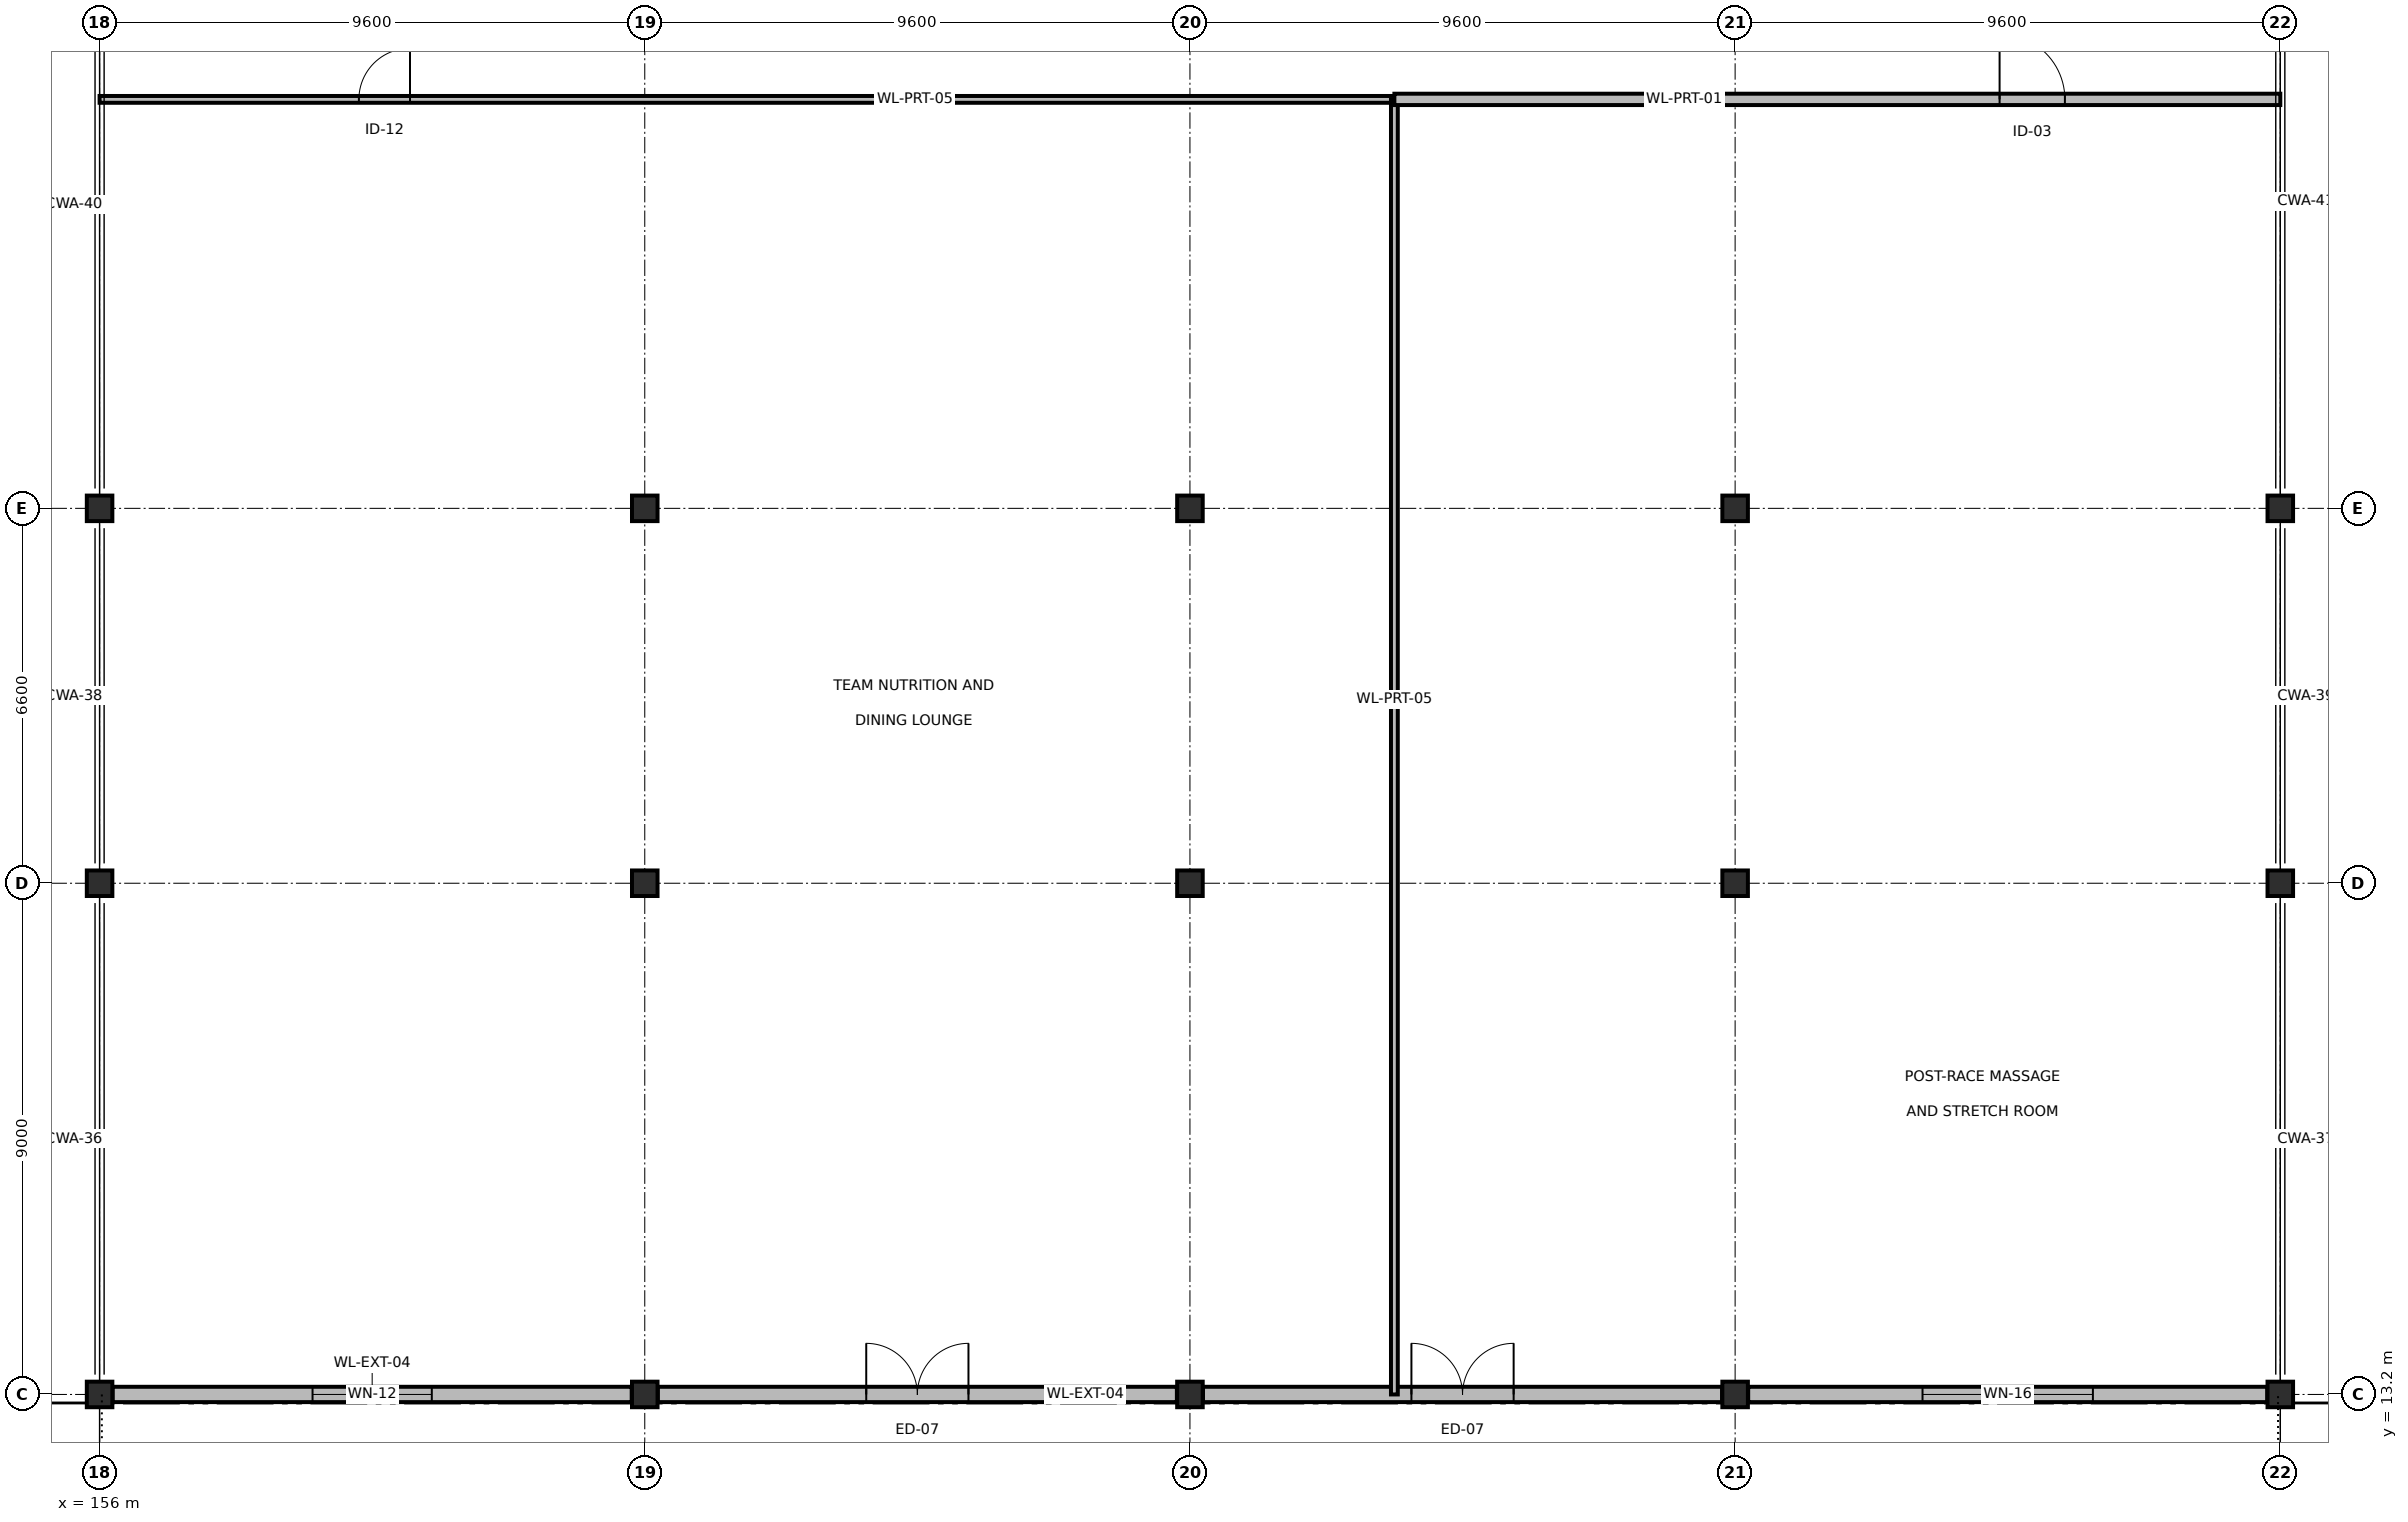
"""IFC4 building model, lengths in metres.
Left out: names, types, materials, properties, quantities, classifications, styles, units other than length and angle.
Written with IfcOpenShell. Run it as: python <this file> out.ifc"""

import sys

from ifc_helpers import new_model, si_unit, direction, frame, frame_2d, origin, origin_2d, place, context, subcontext, project, spatial, rectangle, extrude, element, fill, save


model = new_model("IFC4")
c1 = context("Model", 3, precision=1e-05, world=origin(), true_north=direction((0.0, 1.0)))
c2 = subcontext(c1, "Body", "Model", "MODEL_VIEW")
j1 = project(units=[si_unit("LENGTHUNIT", "METRE"), si_unit("PLANEANGLEUNIT", "RADIAN")], contexts=[c1])
p1 = place(None, origin())
s1 = spatial("IfcSite", under=j1, at=p1, CompositionType="ELEMENT")
p2 = place(p1, origin())
s2 = spatial("IfcBuilding", under=s1, at=p2, CompositionType="ELEMENT")
p3 = place(p2, frame((0.0, 0.0, 9.6)))
s3 = spatial("IfcBuildingStorey", under=s2, at=p3, CompositionType="ELEMENT", Elevation=9.6)
for number, where, z_axis, x_axis in (
    (1, (156.0, 13.2, 0.0), (0.0, 0.0, 1.0), (1.0, 0.0, 0.0)),
    (2, (156.0, 22.2, 0.0), (0.0, 0.0, 1.0), (1.0, 0.0, 0.0)),
    (3, (156.0, 28.8, 0.0), (0.0, 0.0, 1.0), (1.0, 0.0, 0.0)),
    (4, (165.6, 13.2, 0.0), (0.0, 0.0, 1.0), (1.0, 0.0, 0.0)),
    (5, (165.6, 22.2, 0.0), (0.0, 0.0, 1.0), (1.0, 0.0, 0.0)),
    (6, (165.6, 28.8, 0.0), (0.0, 0.0, 1.0), (1.0, 0.0, 0.0)),
    (7, (175.2, 13.2, 0.0), (0.0, 0.0, 1.0), (1.0, 0.0, 0.0)),
    (8, (175.2, 22.2, 0.0), (0.0, 0.0, 1.0), (1.0, 0.0, 0.0)),
    (9, (175.2, 28.8, 0.0), (0.0, 0.0, 1.0), (1.0, 0.0, 0.0)),
    (10, (184.8, 13.2, 0.0), (0.0, 0.0, 1.0), (1.0, 0.0, 0.0)),
    (11, (184.8, 22.2, 0.0), (0.0, 0.0, 1.0), (1.0, 0.0, 0.0)),
    (12, (184.8, 28.8, 0.0), (0.0, 0.0, 1.0), (1.0, 0.0, 0.0)),
    (13, (194.4, 13.2, 0.0), (0.0, 0.0, 1.0), (1.0, 0.0, 0.0)),
    (14, (194.4, 22.2, 0.0), (0.0, 0.0, 1.0), (1.0, 0.0, 0.0)),
    (15, (194.4, 28.8, 0.0), (0.0, 0.0, 1.0), (1.0, 0.0, 0.0)),
):
    element("IfcColumn", number, at=place(p3, frame(where, z_axis=z_axis, x_axis=x_axis)), inside=s3, PredefinedType="COLUMN", context=c2, shape_type="SweptSolid", body=[
        extrude(rectangle(XDim=0.45, YDim=0.45, at=origin_2d()), origin(), (0.0, 0.0, 1.0), 4.5),
    ])
p4 = place(p3, frame((165.37, 13.2, 0.0), z_axis=(0.0, 0.0, 1.0), x_axis=(-1.0, 0.0, 0.0)))
e16 = element("IfcWall", 16, at=p4, inside=s3, PredefinedType="SOLIDWALL", context=c2, shape_type="SweptSolid", body=[
    extrude(rectangle(XDim=9.14, YDim=0.27, at=frame_2d((4.57, 0.0))), origin(), (0.0, 0.0, 1.0), 3.535),
])
p5 = place(p4, frame((3.52, 0.0, 0.95)))
e17 = element("IfcOpeningElement", 17, at=p5, cuts=e16, PredefinedType="OPENING", context=c2, shape_type="SweptSolid", body=[
    extrude(rectangle(XDim=2.1, YDim=1.5, at=frame_2d((1.05, 0.75))), frame((0.0, 0.145, 0.0), z_axis=(0.0, -1.0, 0.0), x_axis=(1.0, 0.0, 0.0)), (0.0, 0.0, 1.0), 0.29),
])
p6 = place(p3, frame((174.97, 13.2, 0.0), z_axis=(0.0, 0.0, 1.0), x_axis=(-1.0, 0.0, 0.0)))
e18 = element("IfcWall", 18, at=p6, inside=s3, PredefinedType="SOLIDWALL", context=c2, shape_type="SweptSolid", body=[
    extrude(rectangle(XDim=9.14, YDim=0.27, at=frame_2d((4.57, 0.0))), origin(), (0.0, 0.0, 1.0), 3.535),
])
p7 = place(p6, frame((3.67, 0.0, 0.0)))
e19 = element("IfcOpeningElement", 19, at=p7, cuts=e18, PredefinedType="OPENING", context=c2, shape_type="SweptSolid", body=[
    extrude(rectangle(XDim=1.8, YDim=2.3, at=frame_2d((0.9, 1.15))), frame((0.0, 0.145, 0.0), z_axis=(0.0, -1.0, 0.0), x_axis=(1.0, 0.0, 0.0)), (0.0, 0.0, 1.0), 0.29),
])
p8 = place(p3, frame((184.57, 13.2, 0.0), z_axis=(0.0, 0.0, 1.0), x_axis=(-1.0, 0.0, 0.0)))
e20 = element("IfcWall", 20, at=p8, inside=s3, PredefinedType="SOLIDWALL", context=c2, shape_type="SweptSolid", body=[
    extrude(rectangle(XDim=9.14, YDim=0.27, at=frame_2d((4.57, 0.0))), origin(), (0.0, 0.0, 1.0), 3.535),
])
p9 = place(p8, frame((3.67, 0.0, 0.0)))
e21 = element("IfcOpeningElement", 21, at=p9, cuts=e20, PredefinedType="OPENING", context=c2, shape_type="SweptSolid", body=[
    extrude(rectangle(XDim=1.8, YDim=2.3, at=frame_2d((0.9, 1.15))), frame((0.0, 0.145, 0.0), z_axis=(0.0, -1.0, 0.0), x_axis=(1.0, 0.0, 0.0)), (0.0, 0.0, 1.0), 0.29),
])
p10 = place(p3, frame((194.17, 13.2, 0.0), z_axis=(0.0, 0.0, 1.0), x_axis=(-1.0, 0.0, 0.0)))
e22 = element("IfcWall", 22, at=p10, inside=s3, PredefinedType="SOLIDWALL", context=c2, shape_type="SweptSolid", body=[
    extrude(rectangle(XDim=9.14, YDim=0.27, at=frame_2d((4.57, 0.0))), origin(), (0.0, 0.0, 1.0), 3.535),
])
p11 = place(p10, frame((3.07, 0.0, 0.85)))
e23 = element("IfcOpeningElement", 23, at=p11, cuts=e22, PredefinedType="OPENING", context=c2, shape_type="SweptSolid", body=[
    extrude(rectangle(XDim=3.0, YDim=1.8, at=frame_2d((1.5, 0.9))), frame((0.0, 0.145, 0.0), z_axis=(0.0, -1.0, 0.0), x_axis=(1.0, 0.0, 0.0)), (0.0, 0.0, 1.0), 0.29),
])
p12 = place(p3, frame((156.0, 36.0, 0.0), z_axis=(0.0, 0.0, 1.0), x_axis=(1.0, 0.0, 0.0)))
e24 = element("IfcWall", 24, at=p12, inside=s3, PredefinedType="PARTITIONING", context=c2, shape_type="SweptSolid", body=[
    extrude(rectangle(XDim=22.8, YDim=0.12, at=frame_2d((11.4, 0.0))), origin(), (0.0, 0.0, 1.0), 3.485),
])
p13 = place(p12, frame((4.566, 0.0, 0.0)))
e25 = element("IfcOpeningElement", 25, at=p13, cuts=e24, PredefinedType="OPENING", context=c2, shape_type="SweptSolid", body=[
    extrude(rectangle(XDim=0.9, YDim=2.1, at=frame_2d((0.45, 1.05))), frame((0.0, 0.07, 0.0), z_axis=(0.0, -1.0, 0.0), x_axis=(1.0, 0.0, 0.0)), (0.0, 0.0, 1.0), 0.14),
])
p14 = place(p3, frame((178.8, 13.2, 0.0), z_axis=(0.0, 0.0, 1.0), x_axis=(0.0, 1.0, 0.0)))
e26 = element("IfcWall", 26, at=p14, inside=s3, PredefinedType="PARTITIONING", context=c2, shape_type="SweptSolid", body=[
    extrude(rectangle(XDim=22.8, YDim=0.12, at=frame_2d((11.4, 0.0))), origin(), (0.0, 0.0, 1.0), 3.535),
])
p15 = place(p3, frame((178.8, 36.0, 0.0), z_axis=(0.0, 0.0, 1.0), x_axis=(1.0, 0.0, 0.0)))
e27 = element("IfcWall", 27, at=p15, inside=s3, PredefinedType="PARTITIONING", context=c2, shape_type="SweptSolid", body=[
    extrude(rectangle(XDim=15.6, YDim=0.2, at=frame_2d((7.8, 0.0))), origin(), (0.0, 0.0, 1.0), 3.485),
])
p16 = place(p15, frame((10.657, 0.0, 0.0)))
e28 = element("IfcOpeningElement", 28, at=p16, cuts=e27, PredefinedType="OPENING", context=c2, shape_type="SweptSolid", body=[
    extrude(rectangle(XDim=1.15, YDim=2.2, at=frame_2d((0.575, 1.1))), frame((0.0, 0.11, 0.0), z_axis=(0.0, -1.0, 0.0), x_axis=(1.0, 0.0, 0.0)), (0.0, 0.0, 1.0), 0.22),
])
p17 = place(p5, origin())
e29 = element("IfcWindow", 29, at=p17, inside=s3, PartitioningType="SINGLE_PANEL", PredefinedType="WINDOW", context=c2, shape_type="SweptSolid", body=[
    extrude(rectangle(XDim=2.1, YDim=1.5, at=frame_2d((1.05, 0.75))), frame((0.0, 0.03, 0.0), z_axis=(0.0, -1.0, 0.0), x_axis=(1.0, 0.0, 0.0)), (0.0, 0.0, 1.0), 0.06),
])
fill(e17, e29)
p18 = place(p7, origin())
e30 = element("IfcDoor", 30, at=p18, inside=s3, OperationType="DOUBLE_DOOR_SINGLE_SWING", PredefinedType="DOOR", context=c2, shape_type="SweptSolid", body=[
    extrude(rectangle(XDim=1.8, YDim=2.3, at=frame_2d((0.9, 1.15))), frame((0.0, 0.025, 0.0), z_axis=(0.0, -1.0, 0.0), x_axis=(1.0, 0.0, 0.0)), (0.0, 0.0, 1.0), 0.05),
])
fill(e19, e30)
p19 = place(p9, origin())
e31 = element("IfcDoor", 31, at=p19, inside=s3, OperationType="DOUBLE_DOOR_SINGLE_SWING", PredefinedType="DOOR", context=c2, shape_type="SweptSolid", body=[
    extrude(rectangle(XDim=1.8, YDim=2.3, at=frame_2d((0.9, 1.15))), frame((0.0, 0.025, 0.0), z_axis=(0.0, -1.0, 0.0), x_axis=(1.0, 0.0, 0.0)), (0.0, 0.0, 1.0), 0.05),
])
fill(e21, e31)
p20 = place(p11, origin())
e32 = element("IfcWindow", 32, at=p20, inside=s3, PartitioningType="SINGLE_PANEL", PredefinedType="WINDOW", context=c2, shape_type="SweptSolid", body=[
    extrude(rectangle(XDim=3.0, YDim=1.8, at=frame_2d((1.5, 0.9))), frame((0.0, 0.03, 0.0), z_axis=(0.0, -1.0, 0.0), x_axis=(1.0, 0.0, 0.0)), (0.0, 0.0, 1.0), 0.06),
])
fill(e23, e32)
p21 = place(p13, origin())
e33 = element("IfcDoor", 33, at=p21, inside=s3, OperationType="SINGLE_SWING_RIGHT", PredefinedType="DOOR", context=c2, shape_type="SweptSolid", body=[
    extrude(rectangle(XDim=0.9, YDim=2.1, at=frame_2d((0.45, 1.05))), frame((0.0, 0.025, 0.0), z_axis=(0.0, -1.0, 0.0), x_axis=(1.0, 0.0, 0.0)), (0.0, 0.0, 1.0), 0.05),
])
fill(e25, e33)
p22 = place(p16, origin())
e34 = element("IfcDoor", 34, at=p22, inside=s3, OperationType="SINGLE_SWING_LEFT", PredefinedType="DOOR", context=c2, shape_type="SweptSolid", body=[
    extrude(rectangle(XDim=1.15, YDim=2.2, at=frame_2d((0.575, 1.1))), frame((0.0, 0.025, 0.0), z_axis=(0.0, -1.0, 0.0), x_axis=(1.0, 0.0, 0.0)), (0.0, 0.0, 1.0), 0.05),
])
fill(e28, e34)
save(model, sys.argv[1])
